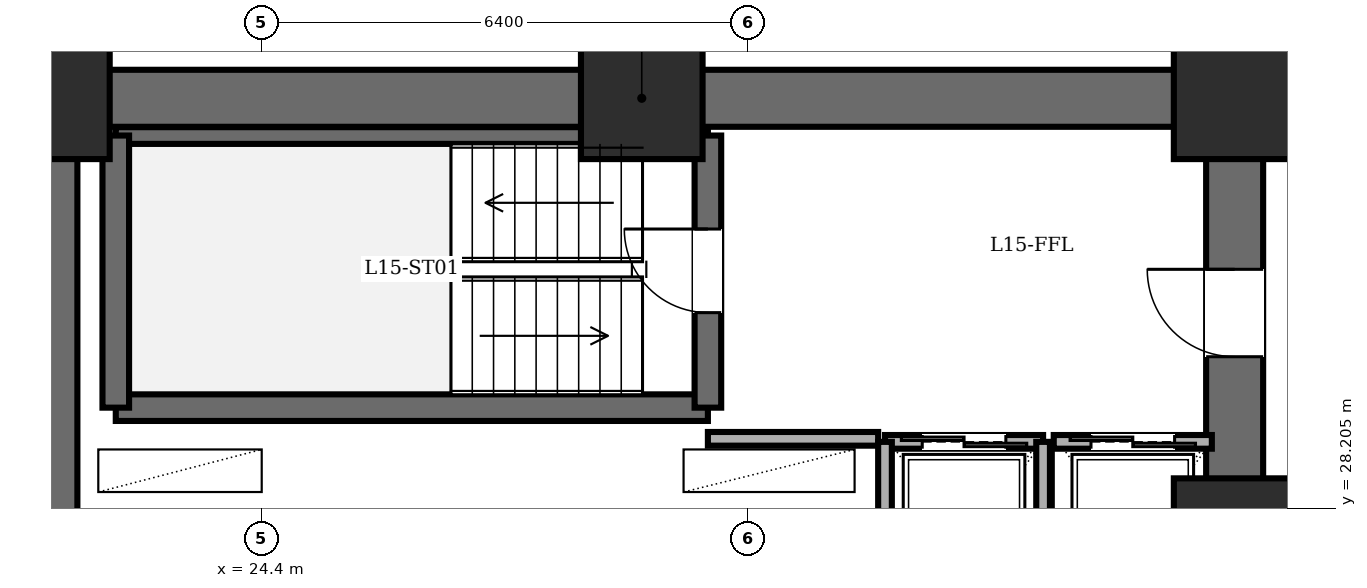
"""IFC4 building model, lengths in metres.
Left out: names, types, materials, properties, quantities, classifications, styles, units other than length and angle.
Written with IfcOpenShell. Run it as: python <this file> out.ifc"""

import sys

from ifc_helpers import new_model, si_unit, direction, frame, frame_2d, origin, origin_2d, place, context, subcontext, project, spatial, rectangle, extrude, element, fill, save


model = new_model("IFC4")
c1 = context("Model", 3, precision=1e-05, world=origin(), true_north=direction((0.0, 1.0)))
c2 = subcontext(c1, "Body", "Model", "MODEL_VIEW")
j1 = project(units=[si_unit("LENGTHUNIT", "METRE"), si_unit("PLANEANGLEUNIT", "RADIAN")], contexts=[c1])
p1 = place(None, origin())
s1 = spatial("IfcSite", under=j1, at=p1, CompositionType="ELEMENT")
p2 = place(p1, origin())
s2 = spatial("IfcBuilding", under=s1, at=p2, CompositionType="ELEMENT")
p3 = place(p2, frame((0.0, 0.0, 57.6)))
s3 = spatial("IfcBuildingStorey", under=s2, at=p3, CompositionType="ELEMENT", Elevation=57.6)
for number, where, z_axis, x_axis in (
    (1, (37.2, 27.8, 0.0), (0.0, 0.0, 1.0), (1.0, 0.0, 0.0)),
    (2, (37.2, 33.6, 0.0), (0.0, 0.0, 1.0), (1.0, 0.0, 0.0)),
    (3, (29.4, 33.6, 0.0), (0.0, 0.0, 1.0), (1.0, 0.0, 0.0)),
    (4, (21.6, 33.6, 0.0), (0.0, 0.0, 1.0), (1.0, 0.0, 0.0)),
):
    element("IfcColumn", number, at=place(p3, frame(where, z_axis=z_axis, x_axis=x_axis)), inside=s3, PredefinedType="COLUMN", context=c2, shape_type="SweptSolid", body=[
        extrude(rectangle(XDim=1.6, YDim=1.6, at=origin_2d()), origin(), (0.0, 0.0, 1.0), 3.6),
    ])
p4 = place(p3, frame((21.6, 14.4, 0.0), z_axis=(0.0, 0.0, 1.0), x_axis=(0.0, 1.0, 0.0)))
e5 = element("IfcWall", 5, at=p4, inside=s3, PredefinedType="SHEAR", context=c2, shape_type="SweptSolid", body=[
    extrude(rectangle(XDim=19.2, YDim=0.75, at=frame_2d((9.6, 0.0))), origin(), (0.0, 0.0, 1.0), 3.4),
])
p5 = place(p3, frame((21.6, 33.6, 0.0), z_axis=(0.0, 0.0, 1.0), x_axis=(1.0, 0.0, 0.0)))
e6 = element("IfcWall", 6, at=p5, inside=s3, PredefinedType="SHEAR", context=c2, shape_type="SweptSolid", body=[
    extrude(rectangle(XDim=15.6, YDim=0.75, at=frame_2d((7.8, 0.0))), origin(), (0.0, 0.0, 1.0), 3.4),
])
p6 = place(p3, frame((37.2, 14.4, 0.0), z_axis=(0.0, 0.0, 1.0), x_axis=(0.0, 1.0, 0.0)))
e7 = element("IfcWall", 7, at=p6, inside=s3, PredefinedType="SHEAR", context=c2, shape_type="SweptSolid", body=[
    extrude(rectangle(XDim=19.2, YDim=0.75, at=frame_2d((9.6, 0.0))), origin(), (0.0, 0.0, 1.0), 3.4),
])
p7 = place(p6, frame((15.8, 0.0, 0.0)))
e8 = element("IfcOpeningElement", 8, at=p7, cuts=e7, PredefinedType="OPENING", context=c2, shape_type="SweptSolid", body=[
    extrude(rectangle(XDim=1.15, YDim=2.15, at=frame_2d((0.575, 1.075))), frame((0.0, 0.385, 0.0), z_axis=(0.0, -1.0, 0.0), x_axis=(1.0, 0.0, 0.0)), (0.0, 0.0, 1.0), 0.77),
])
p8 = place(p6, frame((3.6, 0.0, 0.0)))
e9 = element("IfcOpeningElement", 9, at=p8, cuts=e7, PredefinedType="OPENING", context=c2, shape_type="SweptSolid", body=[
    extrude(rectangle(XDim=1.1, YDim=2.15, at=frame_2d((0.55, 1.075))), frame((0.0, 0.385, 0.0), z_axis=(0.0, -1.0, 0.0), x_axis=(1.0, 0.0, 0.0)), (0.0, 0.0, 1.0), 0.77),
])
p9 = place(p6, frame((8.6, 0.0, 0.0)))
e10 = element("IfcOpeningElement", 10, at=p9, cuts=e7, PredefinedType="OPENING", context=c2, shape_type="SweptSolid", body=[
    extrude(rectangle(XDim=1.3, YDim=2.2, at=frame_2d((0.65, 1.1))), frame((0.0, 0.385, 0.0), z_axis=(0.0, -1.0, 0.0), x_axis=(1.0, 0.0, 0.0)), (0.0, 0.0, 1.0), 0.77),
])
p10 = place(p3, frame((22.48, 29.53, 0.0), z_axis=(0.0, 0.0, 1.0), x_axis=(1.0, 0.0, 0.0)))
e11 = element("IfcWall", 11, at=p10, inside=s3, PredefinedType="SOLIDWALL", context=c2, shape_type="SweptSolid", body=[
    extrude(rectangle(XDim=7.79, YDim=0.35, at=frame_2d((3.895, 0.0))), origin(), (0.0, 0.0, 1.0), 3.4),
])
p11 = place(p3, frame((22.48, 33.11, 0.0), z_axis=(0.0, 0.0, 1.0), x_axis=(1.0, 0.0, 0.0)))
e12 = element("IfcWall", 12, at=p11, inside=s3, PredefinedType="PARTITIONING", context=c2, shape_type="SweptSolid", body=[
    extrude(rectangle(XDim=7.79, YDim=0.22, at=frame_2d((3.895, 0.0))), origin(), (0.0, 0.0, 1.0), 3.4),
])
p12 = place(p3, frame((22.48, 29.53, 0.0), z_axis=(0.0, 0.0, 1.0), x_axis=(0.0, 1.0, 0.0)))
e13 = element("IfcWall", 13, at=p12, inside=s3, PredefinedType="SOLIDWALL", context=c2, shape_type="SweptSolid", body=[
    extrude(rectangle(XDim=3.58, YDim=0.35, at=frame_2d((1.79, 0.0))), origin(), (0.0, 0.0, 1.0), 3.4),
])
p13 = place(p3, frame((30.27, 29.53, 0.0), z_axis=(0.0, 0.0, 1.0), x_axis=(0.0, 1.0, 0.0)))
e14 = element("IfcWall", 14, at=p13, inside=s3, PredefinedType="SOLIDWALL", context=c2, shape_type="SweptSolid", body=[
    extrude(rectangle(XDim=3.58, YDim=0.35, at=frame_2d((1.79, 0.0))), origin(), (0.0, 0.0, 1.0), 3.4),
])
p14 = place(p13, frame((1.25, 0.0, 0.0)))
e15 = element("IfcOpeningElement", 15, at=p14, cuts=e14, PredefinedType="OPENING", context=c2, shape_type="SweptSolid", body=[
    extrude(rectangle(XDim=1.1, YDim=2.15, at=frame_2d((0.55, 1.075))), frame((0.0, 0.185, 0.0), z_axis=(0.0, -1.0, 0.0), x_axis=(1.0, 0.0, 0.0)), (0.0, 0.0, 1.0), 0.37),
])
p15 = place(p3, frame((30.27, 29.12, 0.0), z_axis=(0.0, 0.0, 1.0), x_axis=(1.0, 0.0, 0.0)))
e16 = element("IfcWall", 16, at=p15, inside=s3, PredefinedType="PARTITIONING", context=c2, shape_type="SweptSolid", body=[
    extrude(rectangle(XDim=2.24, YDim=0.18, at=frame_2d((1.12, 0.0))), origin(), (0.0, 0.0, 1.0), 3.4),
])
p16 = place(p3, frame((32.6, 29.08, 0.0), z_axis=(0.0, 0.0, 1.0), x_axis=(1.0, 0.0, 0.0)))
e17 = element("IfcWall", 17, at=p16, inside=s3, PredefinedType="PARTITIONING", context=c2, shape_type="SweptSolid", body=[
    extrude(rectangle(XDim=2.08, YDim=0.18, at=frame_2d((1.04, 0.0))), origin(), (0.0, 0.0, 1.0), 3.4),
])
p17 = place(p16, frame((0.49, 0.0, 0.0)))
e18 = element("IfcOpeningElement", 18, at=p17, cuts=e17, PredefinedType="OPENING", context=c2, shape_type="SweptSolid", body=[
    extrude(rectangle(XDim=1.1, YDim=2.2, at=frame_2d((0.55, 1.1))), frame((0.0, 0.1, 0.0), z_axis=(0.0, -1.0, 0.0), x_axis=(1.0, 0.0, 0.0)), (0.0, 0.0, 1.0), 0.2),
])
for number, where, z_axis, x_axis in (
    (19, (34.68, 26.35, 0.0), (0.0, 0.0, 1.0), (0.0, 1.0, 0.0)),
    (20, (32.6, 29.08, 0.0), (0.0, 0.0, 1.0), (0.0, -1.0, 0.0)),
):
    element("IfcWall", number, at=place(p3, frame(where, z_axis=z_axis, x_axis=x_axis)), inside=s3, PredefinedType="PARTITIONING", context=c2, shape_type="SweptSolid", body=[
        extrude(rectangle(XDim=2.73, YDim=0.18, at=frame_2d((1.365, 0.0))), origin(), (0.0, 0.0, 1.0), 3.4),
    ])
p18 = place(p3, frame((34.82, 29.08, 0.0), z_axis=(0.0, 0.0, 1.0), x_axis=(1.0, 0.0, 0.0)))
e21 = element("IfcWall", 21, at=p18, inside=s3, PredefinedType="PARTITIONING", context=c2, shape_type="SweptSolid", body=[
    extrude(rectangle(XDim=2.08, YDim=0.18, at=frame_2d((1.04, 0.0))), origin(), (0.0, 0.0, 1.0), 3.4),
])
p19 = place(p18, frame((0.49, 0.0, 0.0)))
e22 = element("IfcOpeningElement", 22, at=p19, cuts=e21, PredefinedType="OPENING", context=c2, shape_type="SweptSolid", body=[
    extrude(rectangle(XDim=1.1, YDim=2.2, at=frame_2d((0.55, 1.1))), frame((0.0, 0.1, 0.0), z_axis=(0.0, -1.0, 0.0), x_axis=(1.0, 0.0, 0.0)), (0.0, 0.0, 1.0), 0.2),
])
p20 = place(p14, origin())
e23 = element("IfcDoor", 23, at=p20, inside=s3, OperationType="SINGLE_SWING_RIGHT", PredefinedType="DOOR", context=c2, shape_type="SweptSolid", body=[
    extrude(rectangle(XDim=1.1, YDim=2.15, at=frame_2d((0.55, 1.075))), frame((0.0, 0.025, 0.0), z_axis=(0.0, -1.0, 0.0), x_axis=(1.0, 0.0, 0.0)), (0.0, 0.0, 1.0), 0.05),
])
fill(e15, e23)
p21 = place(p7, origin())
e24 = element("IfcDoor", 24, at=p21, inside=s3, OperationType="SINGLE_SWING_RIGHT", PredefinedType="DOOR", context=c2, shape_type="SweptSolid", body=[
    extrude(rectangle(XDim=1.15, YDim=2.15, at=frame_2d((0.575, 1.075))), frame((0.0, 0.025, 0.0), z_axis=(0.0, -1.0, 0.0), x_axis=(1.0, 0.0, 0.0)), (0.0, 0.0, 1.0), 0.05),
])
fill(e8, e24)
p22 = place(p17, origin())
e25 = element("IfcDoor", 25, at=p22, inside=s3, OperationType="DOUBLE_DOOR_SLIDING", PredefinedType="DOOR", context=c2, shape_type="SweptSolid", body=[
    extrude(rectangle(XDim=1.1, YDim=2.2, at=frame_2d((0.55, 1.1))), frame((0.0, 0.025, 0.0), z_axis=(0.0, -1.0, 0.0), x_axis=(1.0, 0.0, 0.0)), (0.0, 0.0, 1.0), 0.05),
])
fill(e18, e25)
p23 = place(p19, origin())
e26 = element("IfcDoor", 26, at=p23, inside=s3, OperationType="DOUBLE_DOOR_SLIDING", PredefinedType="DOOR", context=c2, shape_type="SweptSolid", body=[
    extrude(rectangle(XDim=1.1, YDim=2.2, at=frame_2d((0.55, 1.1))), frame((0.0, 0.025, 0.0), z_axis=(0.0, -1.0, 0.0), x_axis=(1.0, 0.0, 0.0)), (0.0, 0.0, 1.0), 0.05),
])
fill(e22, e26)
save(model, sys.argv[1])
